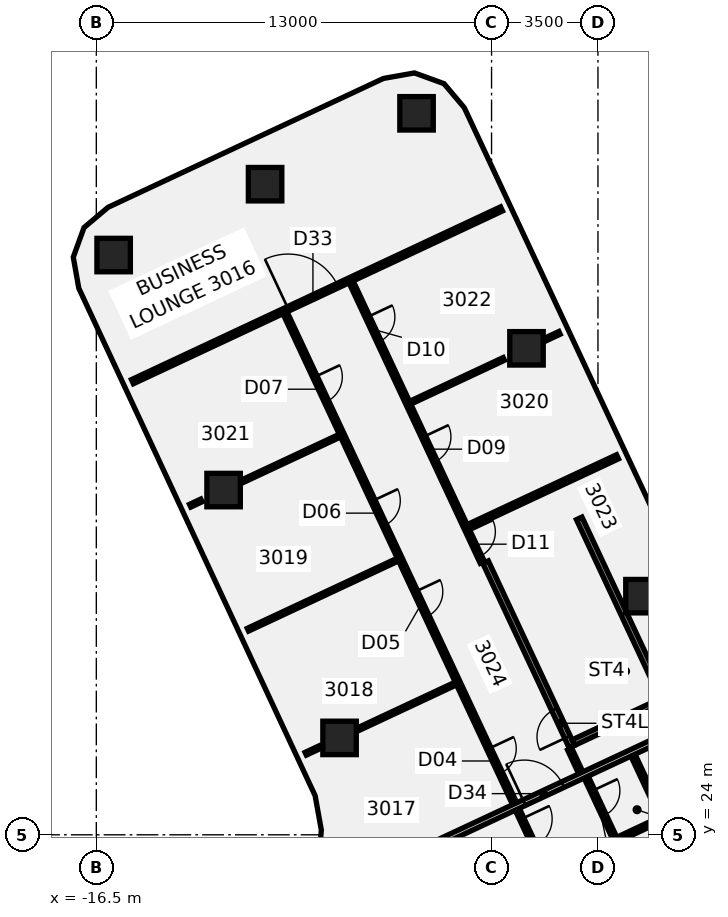
"""IFC4 building model, lengths in metres.
Left out: names, types, materials, properties, quantities, classifications, styles, units other than length and angle.
Written with IfcOpenShell. Run it as: python <this file> out.ifc"""

import sys

from ifc_helpers import new_model, si_unit, direction, frame, frame_2d, origin, origin_2d, place, context, subcontext, project, spatial, polyline, rectangle, outline, extrude, element, fill, save


model = new_model("IFC4")
c1 = context("Model", 3, precision=1e-05, world=origin(), true_north=direction((0.0, 1.0)))
c2 = subcontext(c1, "Body", "Model", "MODEL_VIEW")
j1 = project(units=[si_unit("LENGTHUNIT", "METRE"), si_unit("PLANEANGLEUNIT", "RADIAN")], contexts=[c1])
p1 = place(None, origin())
s1 = spatial("IfcSite", under=j1, at=p1, CompositionType="ELEMENT")
p2 = place(p1, origin())
s2 = spatial("IfcBuilding", under=s1, at=p2, CompositionType="ELEMENT")
p3 = place(p2, frame((0.0, 0.0, 124.75)))
s3 = spatial("IfcBuildingStorey", under=s2, at=p3, CompositionType="ELEMENT", Elevation=124.75)
p4 = place(p3, frame((-12.314, 35.338, -0.138), z_axis=(-0.064699855868, -0.060824433029, 0.9960493547), x_axis=(0.903035286049, 0.421197702581, 0.084378714676)))
e1 = element("IfcColumn", 1, at=p4, inside=s3, PredefinedType="COLUMN", context=c2, shape_type="SweptSolid", body=[
    extrude(rectangle(XDim=1.1, YDim=1.1, at=origin_2d()), origin(), (0.0, 0.0, 1.0), 3.717),
])
p5 = place(p3, frame((-2.35, 40.0, -0.138), z_axis=(-0.088034741194, -0.012351142794, 0.996040829291), x_axis=(0.423052547946, -0.905727436668, 0.026160125068)))
e2 = element("IfcColumn", 2, at=p5, inside=s3, PredefinedType="COLUMN", context=c2, shape_type="SweptSolid", body=[
    extrude(rectangle(XDim=1.1, YDim=1.1, at=origin_2d()), origin(), (0.0, 0.0, 1.0), 3.716),
])
p6 = place(p3, frame((-8.499, 27.187, -0.139), z_axis=(-0.025080401947, -0.041932325564, 0.998805613476), x_axis=(0.905336041768, 0.422762183328, 0.040481944421)))
e3 = element("IfcColumn", 3, at=p6, inside=s3, PredefinedType="COLUMN", context=c2, shape_type="SweptSolid", body=[
    extrude(rectangle(XDim=1.1, YDim=1.1, at=origin_2d()), origin(), (0.0, 0.0, 1.0), 3.709),
])
p7 = place(p3, frame((1.464, 31.849, -0.139), z_axis=(-0.048386644022, 0.00678071338, 0.998805664084), x_axis=(0.422461295082, -0.905990074096, 0.026616532396)))
e4 = element("IfcColumn", 4, at=p7, inside=s3, PredefinedType="COLUMN", context=c2, shape_type="SweptSolid", body=[
    extrude(rectangle(XDim=1.1, YDim=1.1, at=origin_2d()), origin(), (0.0, 0.0, 1.0), 3.708),
])
p8 = place(p3, frame((-5.967, 47.73, -0.138), z_axis=(-0.130588259864, -0.019038669148, 0.991253870339), x_axis=(0.421679598548, -0.905941901453, 0.038152160609)))
e5 = element("IfcColumn", 5, at=p8, inside=s3, PredefinedType="COLUMN", context=c2, shape_type="SweptSolid", body=[
    extrude(rectangle(XDim=1.1, YDim=1.1, at=origin_2d()), origin(), (0.0, 0.0, 1.0), 3.732),
])
p9 = place(p3, frame((-10.949, 45.399, -0.138), z_axis=(-0.119116596528, -0.043196128411, 0.991940185153), x_axis=(0.423188341029, -0.905970442825, 0.011365946715)))
e6 = element("IfcColumn", 6, at=p9, inside=s3, PredefinedType="COLUMN", context=c2, shape_type="SweptSolid", body=[
    extrude(rectangle(XDim=1.1, YDim=1.1, at=origin_2d()), origin(), (0.0, 0.0, 1.0), 3.73),
])
p10 = place(p3, frame((-15.93, 43.068, -0.138), z_axis=(-0.107515850964, -0.067336464177, 0.991920431478), x_axis=(0.899037513011, 0.419376139534, 0.125917448308)))
e7 = element("IfcColumn", 7, at=p10, inside=s3, PredefinedType="COLUMN", context=c2, shape_type="SweptSolid", body=[
    extrude(rectangle(XDim=1.1, YDim=1.1, at=origin_2d()), origin(), (0.0, 0.0, 1.0), 3.731),
])
p11 = place(p3, frame((-10.294, 41.169, 0.0), z_axis=(0.0, 0.0, 1.0), x_axis=(0.423769207005, -0.905770202201, 0.0)))
e8 = element("IfcWall", 8, at=p11, inside=s3, PredefinedType="PARTITIONING", context=c2, shape_type="SweptSolid", body=[
    extrude(rectangle(XDim=20.246, YDim=0.15, at=frame_2d((10.123, 0.0))), origin(), (0.0, 0.0, 1.0), 2.87),
])
p12 = place(p11, frame((18.375, 0.0, 0.0)))
e9 = element("IfcOpeningElement", 9, at=p12, cuts=e8, PredefinedType="OPENING", context=c2, shape_type="SweptSolid", body=[
    extrude(rectangle(XDim=1.0, YDim=2.1, at=frame_2d((0.5, 1.05))), frame((0.0, 0.085, 0.0), z_axis=(0.0, -1.0, 0.0), x_axis=(1.0, 0.0, 0.0)), (0.0, 0.0, 1.0), 0.17),
])
p13 = place(p11, frame((15.825, 0.0, 0.0)))
e10 = element("IfcOpeningElement", 10, at=p13, cuts=e8, PredefinedType="OPENING", context=c2, shape_type="SweptSolid", body=[
    extrude(rectangle(XDim=0.9, YDim=2.1, at=frame_2d((0.45, 1.05))), frame((0.0, 0.085, 0.0), z_axis=(0.0, -1.0, 0.0), x_axis=(1.0, 0.0, 0.0)), (0.0, 0.0, 1.0), 0.17),
])
p14 = place(p11, frame((10.125, 0.0, 0.0)))
e11 = element("IfcOpeningElement", 11, at=p14, cuts=e8, PredefinedType="OPENING", context=c2, shape_type="SweptSolid", body=[
    extrude(rectangle(XDim=0.9, YDim=2.1, at=frame_2d((0.45, 1.05))), frame((0.0, 0.085, 0.0), z_axis=(0.0, -1.0, 0.0), x_axis=(1.0, 0.0, 0.0)), (0.0, 0.0, 1.0), 0.17),
])
p15 = place(p11, frame((6.825, 0.0, 0.0)))
e12 = element("IfcOpeningElement", 12, at=p15, cuts=e8, PredefinedType="OPENING", context=c2, shape_type="SweptSolid", body=[
    extrude(rectangle(XDim=0.9, YDim=2.1, at=frame_2d((0.45, 1.05))), frame((0.0, 0.085, 0.0), z_axis=(0.0, -1.0, 0.0), x_axis=(1.0, 0.0, 0.0)), (0.0, 0.0, 1.0), 0.17),
])
p16 = place(p11, frame((2.325, 0.0, 0.0)))
e13 = element("IfcOpeningElement", 13, at=p16, cuts=e8, PredefinedType="OPENING", context=c2, shape_type="SweptSolid", body=[
    extrude(rectangle(XDim=0.9, YDim=2.1, at=frame_2d((0.45, 1.05))), frame((0.0, 0.085, 0.0), z_axis=(0.0, -1.0, 0.0), x_axis=(1.0, 0.0, 0.0)), (0.0, 0.0, 1.0), 0.17),
])
p17 = place(p3, frame((-8.12, 42.186, 0.0), z_axis=(0.0, 0.0, 1.0), x_axis=(0.423753940866, -0.905777344385, 0.0)))
e14 = element("IfcWall", 14, at=p17, inside=s3, PredefinedType="PARTITIONING", context=c2, shape_type="SweptSolid", body=[
    extrude(rectangle(XDim=10.186, YDim=0.15, at=frame_2d((5.093, 0.0))), origin(), (0.0, 0.0, 1.0), 2.87),
])
p18 = place(p17, frame((5.625, 0.0, 0.0)))
e15 = element("IfcOpeningElement", 15, at=p18, cuts=e14, PredefinedType="OPENING", context=c2, shape_type="SweptSolid", body=[
    extrude(rectangle(XDim=0.9, YDim=2.1, at=frame_2d((0.45, 1.05))), frame((0.0, 0.085, 0.0), z_axis=(0.0, -1.0, 0.0), x_axis=(1.0, 0.0, 0.0)), (0.0, 0.0, 1.0), 0.17),
])
p19 = place(p17, frame((1.275, 0.0, 0.0)))
e16 = element("IfcOpeningElement", 16, at=p19, cuts=e14, PredefinedType="OPENING", context=c2, shape_type="SweptSolid", body=[
    extrude(rectangle(XDim=0.9, YDim=2.1, at=frame_2d((0.45, 1.05))), frame((0.0, 0.085, 0.0), z_axis=(0.0, -1.0, 0.0), x_axis=(1.0, 0.0, 0.0)), (0.0, 0.0, 1.0), 0.17),
])
p20 = place(p17, frame((9.075, 0.0, 0.0)))
e17 = element("IfcOpeningElement", 17, at=p20, cuts=e14, PredefinedType="OPENING", context=c2, shape_type="SweptSolid", body=[
    extrude(rectangle(XDim=0.9, YDim=2.1, at=frame_2d((0.45, 1.05))), frame((0.0, 0.085, 0.0), z_axis=(0.0, -1.0, 0.0), x_axis=(1.0, 0.0, 0.0)), (0.0, 0.0, 1.0), 0.17),
])
p21 = place(p3, frame((-0.931, 26.82, 0.0), z_axis=(0.0, 0.0, 1.0), x_axis=(0.423786528485, -0.905762098056, 0.0)))
e18 = element("IfcWall", 18, at=p21, inside=s3, PredefinedType="PARTITIONING", context=c2, shape_type="SweptSolid", body=[
    extrude(rectangle(XDim=0.86, YDim=0.15, at=frame_2d((0.43, 0.0))), origin(), (0.0, 0.0, 1.0), 2.87),
])
p22 = place(p3, frame((-0.388, 25.898, 0.0), z_axis=(0.0, 0.0, 1.0), x_axis=(0.423693860777, -0.905805449498, 0.0)))
e19 = element("IfcWall", 19, at=p22, inside=s3, PredefinedType="PARTITIONING", context=c2, shape_type="SweptSolid", body=[
    extrude(rectangle(XDim=2.215, YDim=0.15, at=frame_2d((1.107, 0.0))), origin(), (0.0, 0.0, 1.0), 2.97),
])
p23 = place(p22, frame((0.495, 0.0, 0.0)))
e20 = element("IfcOpeningElement", 20, at=p23, cuts=e19, PredefinedType="OPENING", context=c2, shape_type="SweptSolid", body=[
    extrude(rectangle(XDim=0.9, YDim=2.1, at=frame_2d((0.45, 1.05))), frame((0.0, 0.085, 0.0), z_axis=(0.0, -1.0, 0.0), x_axis=(1.0, 0.0, 0.0)), (0.0, 0.0, 1.0), 0.17),
])
p24 = place(p3, frame((1.152, 26.618, 0.0), z_axis=(0.0, 0.0, 1.0), x_axis=(0.423667153788, -0.905817941311, 0.0)))
e21 = element("IfcWall", 21, at=p24, inside=s3, PredefinedType="PARTITIONING", context=c2, shape_type="SweptSolid", body=[
    extrude(rectangle(XDim=3.419, YDim=0.15, at=frame_2d((1.709, 0.0))), origin(), (0.0, 0.0, 1.0), 2.97),
])
p25 = place(p24, frame((2.444, 0.0, 0.0)))
e22 = element("IfcOpeningElement", 22, at=p25, cuts=e21, PredefinedType="OPENING", context=c2, shape_type="SweptSolid", body=[
    extrude(rectangle(XDim=0.9, YDim=2.1, at=frame_2d((0.45, 1.05))), frame((0.0, 0.085, 0.0), z_axis=(0.0, -1.0, 0.0), x_axis=(1.0, 0.0, 0.0)), (0.0, 0.0, 1.0), 0.17),
])
p26 = place(p3, frame((-15.312, 38.903, 0.0), z_axis=(0.0, 0.0, 1.0), x_axis=(0.905714478496, 0.423888291231, 0.0)))
e23 = element("IfcWall", 23, at=p26, inside=s3, PredefinedType="PARTITIONING", context=c2, shape_type="SweptSolid", body=[
    extrude(rectangle(XDim=13.404, YDim=0.15, at=frame_2d((6.702, 0.0))), origin(), (0.0, 0.0, 1.0), 2.87),
])
p27 = place(p26, frame((5.656, 0.0, 0.0)))
e24 = element("IfcOpeningElement", 24, at=p27, cuts=e23, PredefinedType="OPENING", context=c2, shape_type="SweptSolid", body=[
    extrude(rectangle(XDim=1.8, YDim=2.1, at=frame_2d((0.9, 1.05))), frame((0.0, 0.085, 0.0), z_axis=(0.0, -1.0, 0.0), x_axis=(1.0, 0.0, 0.0)), (0.0, 0.0, 1.0), 0.17),
])
p28 = place(p3, frame((-13.413, 34.825, 0.0), z_axis=(0.0, 0.0, 1.0), x_axis=(0.905846575119, 0.423605928127, 0.0)))
e25 = element("IfcWall", 25, at=p28, inside=s3, PredefinedType="PARTITIONING", context=c2, shape_type="SweptSolid", body=[
    extrude(rectangle(XDim=0.408, YDim=0.1, at=frame_2d((0.204, 0.0))), origin(), (0.0, 0.0, 1.0), 2.97),
])
p29 = place(p3, frame((-11.852, 35.555, 0.0), z_axis=(0.0, 0.0, 1.0), x_axis=(0.905779849786, 0.423748585511, 0.0)))
e26 = element("IfcWall", 26, at=p29, inside=s3, PredefinedType="PARTITIONING", context=c2, shape_type="SweptSolid", body=[
    extrude(rectangle(XDim=3.716, YDim=0.1, at=frame_2d((1.858, 0.0))), origin(), (0.0, 0.0, 1.0), 2.87),
])
p30 = place(p3, frame((-6.177, 38.21, 0.0), z_axis=(0.0, 0.0, 1.0), x_axis=(0.905768212008, 0.423773460845, 0.0)))
e27 = element("IfcWall", 27, at=p30, inside=s3, PredefinedType="PARTITIONING", context=c2, shape_type="SweptSolid", body=[
    extrude(rectangle(XDim=3.401, YDim=0.1, at=frame_2d((1.7, 0.0))), origin(), (0.0, 0.0, 1.0), 2.87),
])
p31 = place(p3, frame((-1.906, 40.208, 0.0), z_axis=(0.0, 0.0, 1.0), x_axis=(0.905769019078, 0.423771735818, 0.0)))
e28 = element("IfcWall", 28, at=p31, inside=s3, PredefinedType="PARTITIONING", context=c2, shape_type="SweptSolid", body=[
    extrude(rectangle(XDim=0.709, YDim=0.1, at=frame_2d((0.354, 0.0))), origin(), (0.0, 0.0, 1.0), 2.97),
])
p32 = place(p3, frame((-11.513, 30.745, 0.0), z_axis=(0.0, 0.0, 1.0), x_axis=(0.905786512013, 0.423734344438, 0.0)))
e29 = element("IfcWall", 29, at=p32, inside=s3, PredefinedType="PARTITIONING", context=c2, shape_type="SweptSolid", body=[
    extrude(rectangle(XDim=5.447, YDim=0.1, at=frame_2d((2.723, 0.0))), origin(), (0.0, 0.0, 1.0), 2.87),
])
p33 = place(p3, frame((-4.27, 34.134, 0.0), z_axis=(0.0, 0.0, 1.0), x_axis=(0.905772206223, 0.423764923553, 0.0)))
e30 = element("IfcWall", 30, at=p33, inside=s3, PredefinedType="PARTITIONING", context=c2, shape_type="SweptSolid", body=[
    extrude(rectangle(XDim=5.424, YDim=0.15, at=frame_2d((2.712, 0.0))), origin(), (0.0, 0.0, 1.0), 2.87),
])
p34 = place(p3, frame((-9.613, 26.666, 0.0), z_axis=(0.0, 0.0, 1.0), x_axis=(0.905887159872, 0.423519130121, 0.0)))
e31 = element("IfcWall", 31, at=p34, inside=s3, PredefinedType="PARTITIONING", context=c2, shape_type="SweptSolid", body=[
    extrude(rectangle(XDim=0.506, YDim=0.1, at=frame_2d((0.253, 0.0))), origin(), (0.0, 0.0, 1.0), 2.97),
])
p35 = place(p3, frame((-7.964, 27.437, 0.0), z_axis=(0.0, 0.0, 1.0), x_axis=(0.905736329332, 0.423841599809, 0.0)))
e32 = element("IfcWall", 32, at=p35, inside=s3, PredefinedType="PARTITIONING", context=c2, shape_type="SweptSolid", body=[
    extrude(rectangle(XDim=3.634, YDim=0.1, at=frame_2d((1.817, 0.0))), origin(), (0.0, 0.0, 1.0), 2.97),
])
p36 = place(p3, frame((-8.44, 22.246, 0.0), z_axis=(0.0, 0.0, 1.0), x_axis=(0.905948211467, 0.423388519139, 0.0)))
e33 = element("IfcWall", 33, at=p36, inside=s3, PredefinedType="PARTITIONING", context=c2, shape_type="SweptSolid", body=[
    extrude(rectangle(XDim=14.239, YDim=0.2, at=frame_2d((7.119, 0.0))), origin(), (0.0, 0.0, 1.0), 2.87),
])
p37 = place(p36, frame((6.64, 0.0, 0.0)))
e34 = element("IfcOpeningElement", 34, at=p37, cuts=e33, PredefinedType="OPENING", context=c2, shape_type="SweptSolid", body=[
    extrude(rectangle(XDim=1.4, YDim=2.1, at=frame_2d((0.7, 1.05))), frame((0.0, 0.11, 0.0), z_axis=(0.0, -1.0, 0.0), x_axis=(1.0, 0.0, 0.0)), (0.0, 0.0, 1.0), 0.22),
])
p38 = place(p3, frame((0.583, 23.82, 0.0), z_axis=(0.0, 0.0, 1.0), x_axis=(0.905668132329, 0.423987304153, 0.0)))
e35 = element("IfcWall", 35, at=p38, inside=s3, PredefinedType="PARTITIONING", context=c2, shape_type="SweptSolid", body=[
    extrude(rectangle(XDim=1.625, YDim=0.15, at=frame_2d((0.812, 0.0))), origin(), (0.0, 0.0, 1.0), 2.97),
])
p39 = place(p3, frame((-0.857, 26.899, -0.14), z_axis=(0.0, 0.0, 1.0), x_axis=(-0.423828808535, 0.90574231493, 0.0)))
e36 = element("IfcWall", 36, at=p39, inside=s3, PredefinedType="SHEAR", context=c2, shape_type="SweptSolid", body=[
    extrude(rectangle(XDim=6.7, YDim=0.2, at=frame_2d((3.35, 0.0))), origin(), (0.0, 0.0, 1.0), 3.01),
])
p40 = place(p39, frame((0.35, 0.0, 0.0)))
e37 = element("IfcOpeningElement", 37, at=p40, cuts=e36, PredefinedType="OPENING", context=c2, shape_type="SweptSolid", body=[
    extrude(rectangle(XDim=1.0, YDim=2.1, at=frame_2d((0.5, 1.05))), frame((0.0, 0.11, 0.0), z_axis=(0.0, -1.0, 0.0), x_axis=(1.0, 0.0, 0.0)), (0.0, 0.0, 1.0), 0.22),
])
p41 = place(p3, frame((2.223, 28.34, -0.14), z_axis=(0.0, 0.0, 1.0), x_axis=(-0.423828808535, 0.90574231493, 0.0)))
e38 = element("IfcWall", 38, at=p41, inside=s3, PredefinedType="SHEAR", context=c2, shape_type="SweptSolid", body=[
    extrude(rectangle(XDim=6.7, YDim=0.2, at=frame_2d((3.35, 0.0))), origin(), (0.0, 0.0, 1.0), 3.01),
])
p42 = place(p3, frame((2.09, 28.388, -0.14), z_axis=(0.0, 0.0, 1.0), x_axis=(-0.905751920053, -0.423808281325, 0.0)))
e39 = element("IfcWall", 39, at=p42, inside=s3, PredefinedType="SHEAR", context=c2, shape_type="SweptSolid", body=[
    extrude(rectangle(XDim=3.2, YDim=0.2, at=frame_2d((1.6, 0.0))), origin(), (0.0, 0.0, 1.0), 3.01),
])
p43 = place(p3, frame((0.0, 0.0, -0.14)))
e40 = element("IfcWall", 40, at=p43, inside=s3, PredefinedType="SHEAR", context=c2, shape_type="SweptSolid", body=[
    extrude(outline(polyline([(-0.623, 34.185), (-0.707, 34.366), (-3.606, 33.01), (-3.521, 32.828), (-0.623, 34.185)])), origin(), (0.0, 0.0, 1.0), 3.01),
])
p44 = place(p12, frame((1.0, 0.0, 0.0), z_axis=(0.0, 0.0, 1.0), x_axis=(-1.0, 0.0, 0.0)))
e41 = element("IfcDoor", 41, at=p44, inside=s3, OperationType="SINGLE_SWING_RIGHT", PredefinedType="DOOR", context=c2, shape_type="SweptSolid", body=[
    extrude(rectangle(XDim=1.0, YDim=2.1, at=frame_2d((0.5, 1.05))), frame((0.0, 0.025, 0.0), z_axis=(0.0, -1.0, 0.0), x_axis=(1.0, 0.0, 0.0)), (0.0, 0.0, 1.0), 0.05),
])
fill(e9, e41)
p45 = place(p13, frame((0.9, 0.0, 0.0), z_axis=(0.0, 0.0, 1.0), x_axis=(-1.0, 0.0, 0.0)))
e42 = element("IfcDoor", 42, at=p45, inside=s3, OperationType="SINGLE_SWING_RIGHT", PredefinedType="DOOR", context=c2, shape_type="SweptSolid", body=[
    extrude(rectangle(XDim=0.9, YDim=2.1, at=frame_2d((0.45, 1.05))), frame((0.0, 0.025, 0.0), z_axis=(0.0, -1.0, 0.0), x_axis=(1.0, 0.0, 0.0)), (0.0, 0.0, 1.0), 0.05),
])
fill(e10, e42)
p46 = place(p14, frame((0.9, 0.0, 0.0), z_axis=(0.0, 0.0, 1.0), x_axis=(-1.0, 0.0, 0.0)))
e43 = element("IfcDoor", 43, at=p46, inside=s3, OperationType="SINGLE_SWING_RIGHT", PredefinedType="DOOR", context=c2, shape_type="SweptSolid", body=[
    extrude(rectangle(XDim=0.9, YDim=2.1, at=frame_2d((0.45, 1.05))), frame((0.0, 0.025, 0.0), z_axis=(0.0, -1.0, 0.0), x_axis=(1.0, 0.0, 0.0)), (0.0, 0.0, 1.0), 0.05),
])
fill(e11, e43)
p47 = place(p15, frame((0.9, 0.0, 0.0), z_axis=(0.0, 0.0, 1.0), x_axis=(-1.0, 0.0, 0.0)))
e44 = element("IfcDoor", 44, at=p47, inside=s3, OperationType="SINGLE_SWING_LEFT", PredefinedType="DOOR", context=c2, shape_type="SweptSolid", body=[
    extrude(rectangle(XDim=0.9, YDim=2.1, at=frame_2d((0.45, 1.05))), frame((0.0, 0.025, 0.0), z_axis=(0.0, -1.0, 0.0), x_axis=(1.0, 0.0, 0.0)), (0.0, 0.0, 1.0), 0.05),
])
fill(e12, e44)
p48 = place(p16, frame((0.9, 0.0, 0.0), z_axis=(0.0, 0.0, 1.0), x_axis=(-1.0, 0.0, 0.0)))
e45 = element("IfcDoor", 45, at=p48, inside=s3, OperationType="SINGLE_SWING_LEFT", PredefinedType="DOOR", context=c2, shape_type="SweptSolid", body=[
    extrude(rectangle(XDim=0.9, YDim=2.1, at=frame_2d((0.45, 1.05))), frame((0.0, 0.025, 0.0), z_axis=(0.0, -1.0, 0.0), x_axis=(1.0, 0.0, 0.0)), (0.0, 0.0, 1.0), 0.05),
])
fill(e13, e45)
p49 = place(p18, origin())
e46 = element("IfcDoor", 46, at=p49, inside=s3, OperationType="SINGLE_SWING_LEFT", PredefinedType="DOOR", context=c2, shape_type="SweptSolid", body=[
    extrude(rectangle(XDim=0.9, YDim=2.1, at=frame_2d((0.45, 1.05))), frame((0.0, 0.025, 0.0), z_axis=(0.0, -1.0, 0.0), x_axis=(1.0, 0.0, 0.0)), (0.0, 0.0, 1.0), 0.05),
])
fill(e15, e46)
p50 = place(p19, origin())
e47 = element("IfcDoor", 47, at=p50, inside=s3, OperationType="SINGLE_SWING_RIGHT", PredefinedType="DOOR", context=c2, shape_type="SweptSolid", body=[
    extrude(rectangle(XDim=0.9, YDim=2.1, at=frame_2d((0.45, 1.05))), frame((0.0, 0.025, 0.0), z_axis=(0.0, -1.0, 0.0), x_axis=(1.0, 0.0, 0.0)), (0.0, 0.0, 1.0), 0.05),
])
fill(e16, e47)
p51 = place(p20, origin())
e48 = element("IfcDoor", 48, at=p51, inside=s3, OperationType="SINGLE_SWING_LEFT", PredefinedType="DOOR", context=c2, shape_type="SweptSolid", body=[
    extrude(rectangle(XDim=0.9, YDim=2.1, at=frame_2d((0.45, 1.05))), frame((0.0, 0.025, 0.0), z_axis=(0.0, -1.0, 0.0), x_axis=(1.0, 0.0, 0.0)), (0.0, 0.0, 1.0), 0.05),
])
fill(e17, e48)
p52 = place(p23, origin())
e49 = element("IfcDoor", 49, at=p52, inside=s3, OperationType="SINGLE_SWING_RIGHT", PredefinedType="DOOR", context=c2, shape_type="SweptSolid", body=[
    extrude(rectangle(XDim=0.9, YDim=2.1, at=frame_2d((0.45, 1.05))), frame((0.0, 0.025, 0.0), z_axis=(0.0, -1.0, 0.0), x_axis=(1.0, 0.0, 0.0)), (0.0, 0.0, 1.0), 0.05),
])
fill(e20, e49)
p53 = place(p27, origin())
e50 = element("IfcDoor", 50, at=p53, inside=s3, OperationType="DOUBLE_DOOR_SINGLE_SWING", PredefinedType="DOOR", context=c2, shape_type="SweptSolid", body=[
    extrude(rectangle(XDim=1.8, YDim=2.1, at=frame_2d((0.9, 1.05))), frame((0.0, 0.025, 0.0), z_axis=(0.0, -1.0, 0.0), x_axis=(1.0, 0.0, 0.0)), (0.0, 0.0, 1.0), 0.05),
])
fill(e24, e50)
p54 = place(p37, frame((1.4, 0.0, 0.0), z_axis=(0.0, 0.0, 1.0), x_axis=(-1.0, 0.0, 0.0)))
e51 = element("IfcDoor", 51, at=p54, inside=s3, OperationType="DOUBLE_DOOR_SINGLE_SWING", PredefinedType="DOOR", context=c2, shape_type="SweptSolid", body=[
    extrude(rectangle(XDim=1.4, YDim=2.1, at=frame_2d((0.7, 1.05))), frame((0.0, 0.025, 0.0), z_axis=(0.0, -1.0, 0.0), x_axis=(1.0, 0.0, 0.0)), (0.0, 0.0, 1.0), 0.05),
])
fill(e34, e51)
p55 = place(p40, origin())
e52 = element("IfcDoor", 52, at=p55, inside=s3, OperationType="SINGLE_SWING_LEFT", PredefinedType="DOOR", context=c2, shape_type="SweptSolid", body=[
    extrude(rectangle(XDim=1.0, YDim=2.1, at=frame_2d((0.5, 1.05))), frame((0.0, 0.025, 0.0), z_axis=(0.0, -1.0, 0.0), x_axis=(1.0, 0.0, 0.0)), (0.0, 0.0, 1.0), 0.05),
])
fill(e37, e52)
save(model, sys.argv[1])
